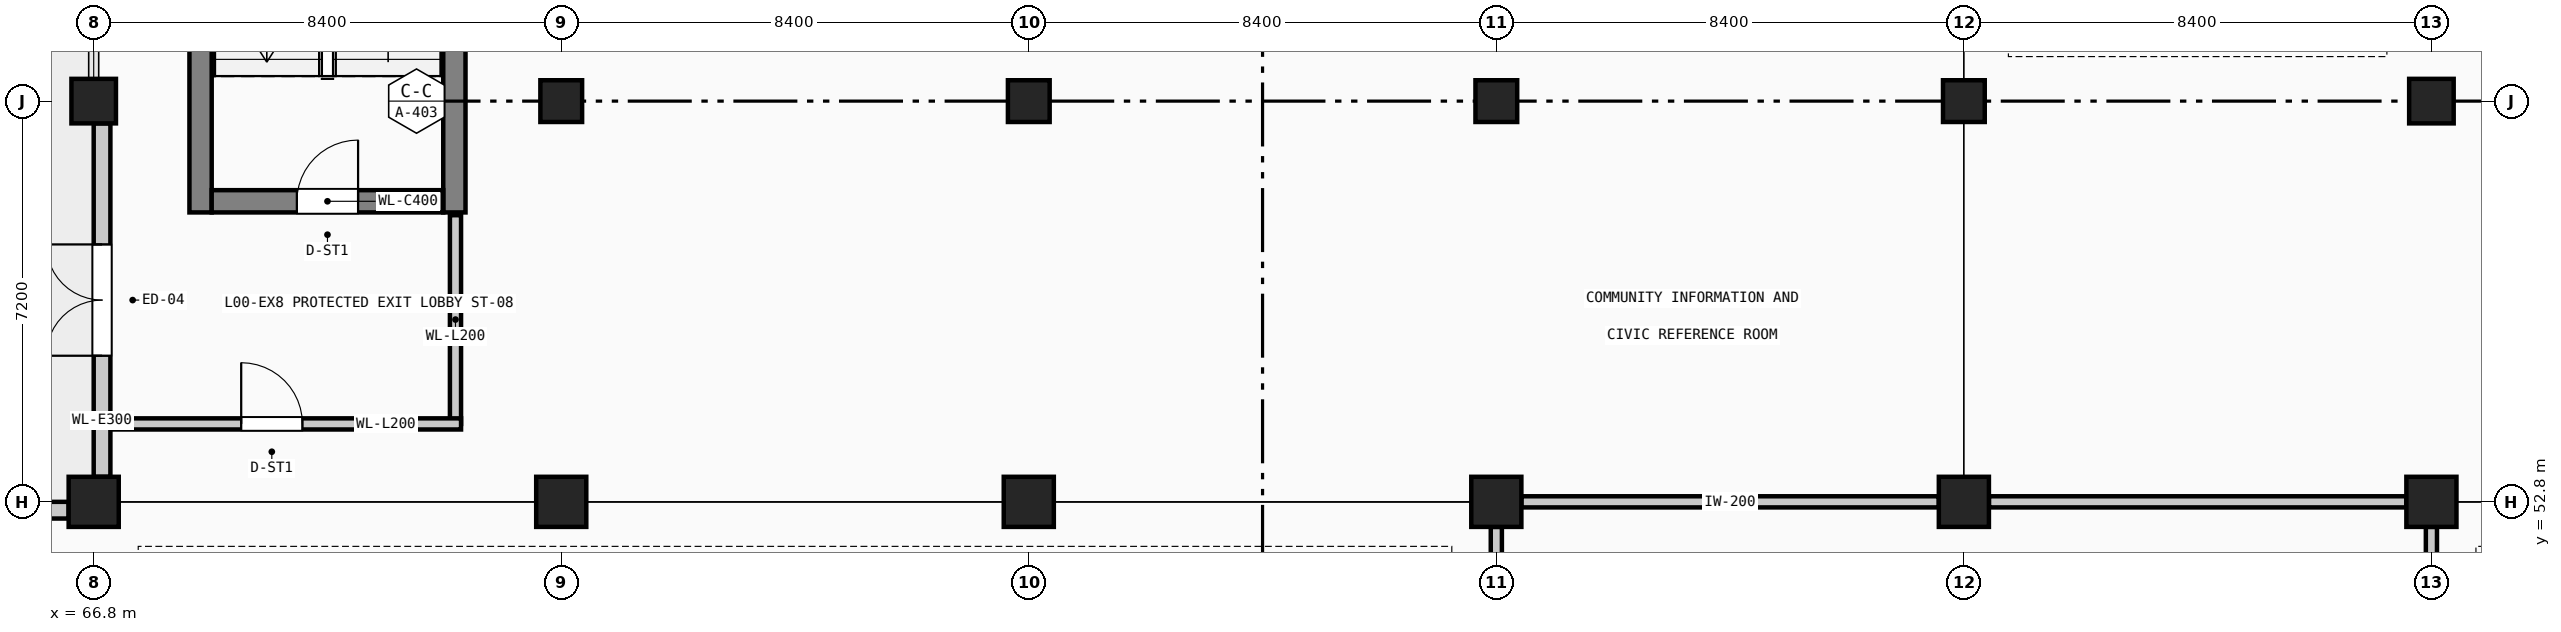
"""IFC4 building model, lengths in metres.
Left out: names, types, materials, properties, quantities, classifications, styles, units other than length and angle.
Written with IfcOpenShell. Run it as: python <this file> out.ifc"""

import sys

from ifc_helpers import new_model, si_unit, direction, frame, frame_2d, origin, origin_2d, place, context, subcontext, project, spatial, rectangle, circle, extrude, element, fill, save


model = new_model("IFC4")
c1 = context("Model", 3, precision=1e-05, world=origin(), true_north=direction((0.0, 1.0)))
c2 = subcontext(c1, "Body", "Model", "MODEL_VIEW")
j1 = project(units=[si_unit("LENGTHUNIT", "METRE"), si_unit("PLANEANGLEUNIT", "RADIAN")], contexts=[c1])
p1 = place(None, origin())
s1 = spatial("IfcSite", under=j1, at=p1, CompositionType="ELEMENT")
p2 = place(p1, origin())
s2 = spatial("IfcBuilding", under=s1, at=p2, CompositionType="ELEMENT")
p3 = place(p2, origin())
s3 = spatial("IfcBuildingStorey", under=s2, at=p3, CompositionType="ELEMENT", Elevation=0.0)
p4 = place(p3, frame((66.8, 52.8, 0.0), z_axis=(0.0, 0.0, 1.0), x_axis=(1.0, 0.0, 0.0)))
e1 = element("IfcColumn", 1, at=p4, inside=s3, PredefinedType="COLUMN", context=c2, shape_type="SweptSolid", body=[
    extrude(rectangle(XDim=0.9, YDim=0.9, at=origin_2d()), origin(), (0.0, 0.0, 1.0), 4.8),
])
p5 = place(p3, frame((66.8, 60.0, 0.0), z_axis=(0.0, 0.0, 1.0), x_axis=(1.0, 0.0, 0.0)))
e2 = element("IfcColumn", 2, at=p5, inside=s3, PredefinedType="COLUMN", context=c2, shape_type="SweptSolid", body=[
    extrude(rectangle(XDim=0.8, YDim=0.8, at=origin_2d()), origin(), (0.0, 0.0, 1.0), 4.8),
])
p6 = place(p3, frame((75.2, 52.8, 0.0), z_axis=(0.0, 0.0, 1.0), x_axis=(1.0, 0.0, 0.0)))
e3 = element("IfcColumn", 3, at=p6, inside=s3, PredefinedType="COLUMN", context=c2, shape_type="SweptSolid", body=[
    extrude(rectangle(XDim=0.9, YDim=0.9, at=origin_2d()), origin(), (0.0, 0.0, 1.0), 4.8),
])
p7 = place(p3, frame((75.2, 60.0, 0.0), z_axis=(0.0, 0.0, 1.0), x_axis=(1.0, 0.0, 0.0)))
e4 = element("IfcColumn", 4, at=p7, inside=s3, PredefinedType="COLUMN", context=c2, shape_type="SweptSolid", body=[
    extrude(circle(Radius=0.375, at=origin_2d()), origin(), (0.0, 0.0, 1.0), 4.8),
])
p8 = place(p3, frame((83.6, 52.8, 0.0), z_axis=(0.0, 0.0, 1.0), x_axis=(1.0, 0.0, 0.0)))
e5 = element("IfcColumn", 5, at=p8, inside=s3, PredefinedType="COLUMN", context=c2, shape_type="SweptSolid", body=[
    extrude(rectangle(XDim=0.9, YDim=0.9, at=origin_2d()), origin(), (0.0, 0.0, 1.0), 4.8),
])
p9 = place(p3, frame((83.6, 60.0, 0.0), z_axis=(0.0, 0.0, 1.0), x_axis=(1.0, 0.0, 0.0)))
e6 = element("IfcColumn", 6, at=p9, inside=s3, PredefinedType="COLUMN", context=c2, shape_type="SweptSolid", body=[
    extrude(circle(Radius=0.375, at=origin_2d()), origin(), (0.0, 0.0, 1.0), 4.8),
])
p10 = place(p3, frame((92.0, 52.8, 0.0), z_axis=(0.0, 0.0, 1.0), x_axis=(1.0, 0.0, 0.0)))
e7 = element("IfcColumn", 7, at=p10, inside=s3, PredefinedType="COLUMN", context=c2, shape_type="SweptSolid", body=[
    extrude(rectangle(XDim=0.9, YDim=0.9, at=origin_2d()), origin(), (0.0, 0.0, 1.0), 4.8),
])
p11 = place(p3, frame((92.0, 60.0, 0.0), z_axis=(0.0, 0.0, 1.0), x_axis=(1.0, 0.0, 0.0)))
e8 = element("IfcColumn", 8, at=p11, inside=s3, PredefinedType="COLUMN", context=c2, shape_type="SweptSolid", body=[
    extrude(circle(Radius=0.375, at=origin_2d()), origin(), (0.0, 0.0, 1.0), 4.8),
])
p12 = place(p3, frame((100.4, 52.8, 0.0), z_axis=(0.0, 0.0, 1.0), x_axis=(1.0, 0.0, 0.0)))
e9 = element("IfcColumn", 9, at=p12, inside=s3, PredefinedType="COLUMN", context=c2, shape_type="SweptSolid", body=[
    extrude(rectangle(XDim=0.9, YDim=0.9, at=origin_2d()), origin(), (0.0, 0.0, 1.0), 4.8),
])
p13 = place(p3, frame((100.4, 60.0, 0.0), z_axis=(0.0, 0.0, 1.0), x_axis=(1.0, 0.0, 0.0)))
e10 = element("IfcColumn", 10, at=p13, inside=s3, PredefinedType="COLUMN", context=c2, shape_type="SweptSolid", body=[
    extrude(circle(Radius=0.375, at=origin_2d()), origin(), (0.0, 0.0, 1.0), 4.8),
])
p14 = place(p3, frame((108.8, 52.8, 0.0), z_axis=(0.0, 0.0, 1.0), x_axis=(1.0, 0.0, 0.0)))
e11 = element("IfcColumn", 11, at=p14, inside=s3, PredefinedType="COLUMN", context=c2, shape_type="SweptSolid", body=[
    extrude(rectangle(XDim=0.9, YDim=0.9, at=origin_2d()), origin(), (0.0, 0.0, 1.0), 4.8),
])
p15 = place(p3, frame((108.8, 60.0, 0.0), z_axis=(0.0, 0.0, 1.0), x_axis=(1.0, 0.0, 0.0)))
e12 = element("IfcColumn", 12, at=p15, inside=s3, PredefinedType="COLUMN", context=c2, shape_type="SweptSolid", body=[
    extrude(rectangle(XDim=0.8, YDim=0.8, at=origin_2d()), origin(), (0.0, 0.0, 1.0), 4.8),
])
for number, where, z_axis, x_axis in (
    (13, (68.72, 58.0, 0.0), (0.0, 0.0, 1.0), (0.0, 1.0, 0.0)),
    (14, (73.28, 67.2, 0.0), (0.0, 0.0, 1.0), (0.0, -1.0, 0.0)),
):
    element("IfcWall", number, at=place(p3, frame(where, z_axis=z_axis, x_axis=x_axis)), inside=s3, PredefinedType="SHEAR", context=c2, shape_type="SweptSolid", body=[
        extrude(rectangle(XDim=9.2, YDim=0.4, at=frame_2d((4.6, 0.0))), origin(), (0.0, 0.0, 1.0), 4.575),
    ])
p16 = place(p3, frame((73.08, 58.2, 0.0), z_axis=(0.0, 0.0, 1.0), x_axis=(-1.0, 0.0, 0.0)))
e15 = element("IfcWall", 15, at=p16, inside=s3, PredefinedType="SHEAR", context=c2, shape_type="SweptSolid", body=[
    extrude(rectangle(XDim=4.16, YDim=0.4, at=frame_2d((2.08, 0.0))), origin(), (0.0, 0.0, 1.0), 4.575),
])
p17 = place(p16, frame((1.53, 0.0, 0.0)))
e16 = element("IfcOpeningElement", 16, at=p17, cuts=e15, PredefinedType="OPENING", context=c2, shape_type="SweptSolid", body=[
    extrude(rectangle(XDim=1.1, YDim=2.2, at=frame_2d((0.55, 1.1))), frame((0.0, 0.21, 0.0), z_axis=(0.0, -1.0, 0.0), x_axis=(1.0, 0.0, 0.0)), (0.0, 0.0, 1.0), 0.42),
])
p18 = place(p3, frame((73.3, 54.2, 0.0), z_axis=(0.0, 0.0, 1.0), x_axis=(0.0, 1.0, 0.0)))
e17 = element("IfcWall", 17, at=p18, inside=s3, PredefinedType="SOLIDWALL", context=c2, shape_type="SweptSolid", body=[
    extrude(rectangle(XDim=3.75, YDim=0.2, at=frame_2d((1.875, 0.0))), origin(), (0.0, 0.0, 1.0), 4.525),
])
p19 = place(p3, frame((67.05, 54.2, 0.0), z_axis=(0.0, 0.0, 1.0), x_axis=(1.0, 0.0, 0.0)))
e18 = element("IfcWall", 18, at=p19, inside=s3, PredefinedType="SOLIDWALL", context=c2, shape_type="SweptSolid", body=[
    extrude(rectangle(XDim=6.35, YDim=0.2, at=frame_2d((3.175, 0.0))), origin(), (0.0, 0.0, 1.0), 4.525),
])
p20 = place(p19, frame((2.4, 0.0, 0.0)))
e19 = element("IfcOpeningElement", 19, at=p20, cuts=e18, PredefinedType="OPENING", context=c2, shape_type="SweptSolid", body=[
    extrude(rectangle(XDim=1.1, YDim=2.2, at=frame_2d((0.55, 1.1))), frame((0.0, 0.11, 0.0), z_axis=(0.0, -1.0, 0.0), x_axis=(1.0, 0.0, 0.0)), (0.0, 0.0, 1.0), 0.22),
])
p21 = place(p3, frame((58.85, 52.65, 0.0), z_axis=(0.0, 0.0, 1.0), x_axis=(1.0, 0.0, 0.0)))
e20 = element("IfcWall", 20, at=p21, inside=s3, PredefinedType="SOLIDWALL", context=c2, shape_type="SweptSolid", body=[
    extrude(rectangle(XDim=7.5, YDim=0.3, at=frame_2d((3.75, 0.0))), origin(), (0.0, 0.0, 1.0), 4.1),
])
p22 = place(p21, frame((2.55, 0.0, 2.1)))
e21 = element("IfcOpeningElement", 21, at=p22, cuts=e20, PredefinedType="OPENING", context=c2, shape_type="SweptSolid", body=[
    extrude(rectangle(XDim=2.4, YDim=1.35, at=frame_2d((1.2, 0.675))), frame((0.0, 0.16, 0.0), z_axis=(0.0, -1.0, 0.0), x_axis=(1.0, 0.0, 0.0)), (0.0, 0.0, 1.0), 0.32),
])
p23 = place(p3, frame((66.95, 53.25, 0.0), z_axis=(0.0, 0.0, 1.0), x_axis=(0.0, 1.0, 0.0)))
e22 = element("IfcWall", 22, at=p23, inside=s3, PredefinedType="SOLIDWALL", context=c2, shape_type="SweptSolid", body=[
    extrude(rectangle(XDim=6.35, YDim=0.3, at=frame_2d((3.175, 0.0))), origin(), (0.0, 0.0, 1.0), 4.2),
])
p24 = place(p23, frame((2.175, 0.0, 0.0)))
e23 = element("IfcOpeningElement", 23, at=p24, cuts=e22, PredefinedType="OPENING", context=c2, shape_type="SweptSolid", body=[
    extrude(rectangle(XDim=2.0, YDim=2.4, at=frame_2d((1.0, 1.2))), frame((0.0, 0.16, 0.0), z_axis=(0.0, -1.0, 0.0), x_axis=(1.0, 0.0, 0.0)), (0.0, 0.0, 1.0), 0.32),
])
p25 = place(p3, frame((92.0, 46.0, 0.0), z_axis=(0.0, 0.0, 1.0), x_axis=(0.0, 1.0, 0.0)))
e24 = element("IfcWall", 24, at=p25, inside=s3, PredefinedType="PARTITIONING", context=c2, shape_type="SweptSolid", body=[
    extrude(rectangle(XDim=6.35, YDim=0.2, at=frame_2d((3.175, 0.0))), origin(), (0.0, 0.0, 1.0), 4.05),
])
p26 = place(p25, frame((2.475, 0.0, 0.0)))
e25 = element("IfcOpeningElement", 25, at=p26, cuts=e24, PredefinedType="OPENING", context=c2, shape_type="SweptSolid", body=[
    extrude(rectangle(XDim=1.4, YDim=2.2, at=frame_2d((0.7, 1.1))), frame((0.0, 0.11, 0.0), z_axis=(0.0, -1.0, 0.0), x_axis=(1.0, 0.0, 0.0)), (0.0, 0.0, 1.0), 0.22),
])
for number, where, z_axis, x_axis in (
    (26, (92.45, 52.8, 0.0), (0.0, 0.0, 1.0), (1.0, 0.0, 0.0)),
    (27, (100.85, 52.8, 0.0), (0.0, 0.0, 1.0), (1.0, 0.0, 0.0)),
):
    element("IfcWall", number, at=place(p3, frame(where, z_axis=z_axis, x_axis=x_axis)), inside=s3, PredefinedType="PARTITIONING", context=c2, shape_type="SweptSolid", body=[
        extrude(rectangle(XDim=7.5, YDim=0.2, at=frame_2d((3.75, 0.0))), origin(), (0.0, 0.0, 1.0), 4.0),
    ])
p27 = place(p3, frame((108.8, 52.35, 0.0), z_axis=(0.0, 0.0, 1.0), x_axis=(0.0, -1.0, 0.0)))
e28 = element("IfcWall", 28, at=p27, inside=s3, PredefinedType="PARTITIONING", context=c2, shape_type="SweptSolid", body=[
    extrude(rectangle(XDim=6.35, YDim=0.2, at=frame_2d((3.175, 0.0))), origin(), (0.0, 0.0, 1.0), 4.05),
])
p28 = place(p17, frame((1.1, 0.0, 0.0), z_axis=(0.0, 0.0, 1.0), x_axis=(-1.0, 0.0, 0.0)))
e29 = element("IfcDoor", 29, at=p28, inside=s3, OperationType="SINGLE_SWING_RIGHT", PredefinedType="DOOR", context=c2, shape_type="SweptSolid", body=[
    extrude(rectangle(XDim=1.1, YDim=2.2, at=frame_2d((0.55, 1.1))), frame((0.0, 0.025, 0.0), z_axis=(0.0, -1.0, 0.0), x_axis=(1.0, 0.0, 0.0)), (0.0, 0.0, 1.0), 0.05),
])
fill(e16, e29)
p29 = place(p20, origin())
e30 = element("IfcDoor", 30, at=p29, inside=s3, OperationType="SINGLE_SWING_LEFT", PredefinedType="DOOR", context=c2, shape_type="SweptSolid", body=[
    extrude(rectangle(XDim=1.1, YDim=2.2, at=frame_2d((0.55, 1.1))), frame((0.0, 0.025, 0.0), z_axis=(0.0, -1.0, 0.0), x_axis=(1.0, 0.0, 0.0)), (0.0, 0.0, 1.0), 0.05),
])
fill(e19, e30)
p30 = place(p24, origin())
e31 = element("IfcDoor", 31, at=p30, inside=s3, OperationType="DOUBLE_DOOR_SINGLE_SWING", PredefinedType="DOOR", context=c2, shape_type="SweptSolid", body=[
    extrude(rectangle(XDim=2.0, YDim=2.4, at=frame_2d((1.0, 1.2))), frame((0.0, 0.025, 0.0), z_axis=(0.0, -1.0, 0.0), x_axis=(1.0, 0.0, 0.0)), (0.0, 0.0, 1.0), 0.05),
])
fill(e23, e31)
save(model, sys.argv[1])
